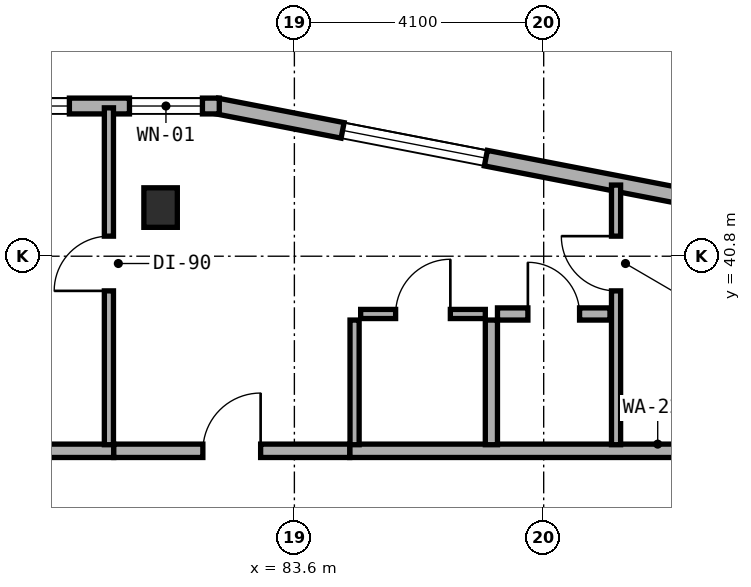
"""IFC4 building model, lengths in metres.
Left out: names, types, materials, properties, quantities, classifications, styles, units other than length and angle.
Written with IfcOpenShell. Run it as: python <this file> out.ifc"""

import sys

from ifc_helpers import new_model, si_unit, direction, frame, frame_2d, origin, origin_2d, place, context, subcontext, project, spatial, rectangle, extrude, element, fill, save


model = new_model("IFC4")
c1 = context("Model", 3, precision=1e-05, world=origin(), true_north=direction((0.0, 1.0)))
c2 = subcontext(c1, "Body", "Model", "MODEL_VIEW")
j1 = project(units=[si_unit("LENGTHUNIT", "METRE"), si_unit("PLANEANGLEUNIT", "RADIAN")], contexts=[c1])
p1 = place(None, origin())
s1 = spatial("IfcSite", under=j1, at=p1, CompositionType="ELEMENT")
p2 = place(p1, origin())
s2 = spatial("IfcBuilding", under=s1, at=p2, CompositionType="ELEMENT")
p3 = place(p2, frame((0.0, 0.0, 124.0)))
s3 = spatial("IfcBuildingStorey", under=s2, at=p3, CompositionType="ELEMENT", Elevation=124.0)
p4 = place(p3, frame((81.4, 41.6, 0.0), z_axis=(0.0, 0.0, 1.0), x_axis=(1.0, 0.0, 0.0)))
e1 = element("IfcColumn", 1, at=p4, inside=s3, PredefinedType="COLUMN", context=c2, shape_type="SweptSolid", body=[
    extrude(rectangle(XDim=0.55, YDim=0.65, at=origin_2d()), origin(), (0.0, 0.0, 1.0), 3.5),
])
p5 = place(p3, frame((90.583, 41.67, 0.0), z_axis=(0.0, 0.0, 1.0), x_axis=(-0.98174070399, 0.190224052445, 0.0)))
e2 = element("IfcWall", 2, at=p5, inside=s3, PredefinedType="STANDARD", context=c2, shape_type="SweptSolid", body=[
    extrude(rectangle(XDim=8.412, YDim=0.26, at=frame_2d((4.206, 0.0))), origin(), (0.0, 0.0, 1.0), 3.25),
])
p6 = place(p5, frame((3.905, 0.0, 0.8)))
e3 = element("IfcOpeningElement", 3, at=p6, cuts=e2, PredefinedType="OPENING", context=c2, shape_type="SweptSolid", body=[
    extrude(rectangle(XDim=2.4, YDim=1.6, at=frame_2d((1.2, 0.8))), frame((0.0, 0.14, 0.0), z_axis=(0.0, -1.0, 0.0), x_axis=(1.0, 0.0, 0.0)), (0.0, 0.0, 1.0), 0.28),
])
p7 = place(p3, frame((82.365, 43.27, 0.0), z_axis=(0.0, 0.0, 1.0), x_axis=(-1.0, 0.0, 0.0)))
e4 = element("IfcWall", 4, at=p7, inside=s3, PredefinedType="STANDARD", context=c2, shape_type="SweptSolid", body=[
    extrude(rectangle(XDim=10.695, YDim=0.26, at=frame_2d((5.348, 0.0))), origin(), (0.0, 0.0, 1.0), 3.25),
])
p8 = place(p7, frame((4.765, 0.0, 0.0)))
e5 = element("IfcOpeningElement", 5, at=p8, cuts=e4, PredefinedType="OPENING", context=c2, shape_type="SweptSolid", body=[
    extrude(rectangle(XDim=1.2, YDim=2.15, at=frame_2d((0.6, 1.075))), frame((0.0, 0.14, 0.0), z_axis=(0.0, -1.0, 0.0), x_axis=(1.0, 0.0, 0.0)), (0.0, 0.0, 1.0), 0.28),
])
p9 = place(p7, frame((0.277, 0.0, 0.85)))
e6 = element("IfcOpeningElement", 6, at=p9, cuts=e4, PredefinedType="OPENING", context=c2, shape_type="SweptSolid", body=[
    extrude(rectangle(XDim=1.2, YDim=1.5, at=frame_2d((0.6, 0.75))), frame((0.0, 0.14, 0.0), z_axis=(0.0, -1.0, 0.0), x_axis=(1.0, 0.0, 0.0)), (0.0, 0.0, 1.0), 0.28),
])
p10 = place(p7, frame((2.465, 0.0, 0.85)))
e7 = element("IfcOpeningElement", 7, at=p10, cuts=e4, PredefinedType="OPENING", context=c2, shape_type="SweptSolid", body=[
    extrude(rectangle(XDim=1.5, YDim=1.5, at=frame_2d((0.75, 0.75))), frame((0.0, 0.14, 0.0), z_axis=(0.0, -1.0, 0.0), x_axis=(1.0, 0.0, 0.0)), (0.0, 0.0, 1.0), 0.28),
])
p11 = place(p7, frame((7.96, 0.0, 0.8)))
e8 = element("IfcOpeningElement", 8, at=p11, cuts=e4, PredefinedType="OPENING", context=c2, shape_type="SweptSolid", body=[
    extrude(rectangle(XDim=2.4, YDim=1.6, at=frame_2d((1.2, 0.8))), frame((0.0, 0.14, 0.0), z_axis=(0.0, -1.0, 0.0), x_axis=(1.0, 0.0, 0.0)), (0.0, 0.0, 1.0), 0.28),
])
p12 = place(p3, frame((74.8, 37.6, 0.0), z_axis=(0.0, 0.0, 1.0), x_axis=(1.0, 0.0, 0.0)))
e9 = element("IfcWall", 9, at=p12, inside=s3, PredefinedType="SOLIDWALL", context=c2, shape_type="SweptSolid", body=[
    extrude(rectangle(XDim=5.83, YDim=0.22, at=frame_2d((2.915, 0.0))), origin(), (0.0, 0.0, 1.0), 3.22),
])
p13 = place(p3, frame((84.51, 37.6, 0.0), z_axis=(0.0, 0.0, 1.0), x_axis=(1.0, 0.0, 0.0)))
e10 = element("IfcWall", 10, at=p13, inside=s3, PredefinedType="SOLIDWALL", context=c2, shape_type="SweptSolid", body=[
    extrude(rectangle(XDim=10.13, YDim=0.22, at=frame_2d((5.065, 0.0))), origin(), (0.0, 0.0, 1.0), 2.945),
])
p14 = place(p3, frame((80.63, 37.6, 0.0), z_axis=(0.0, 0.0, 1.0), x_axis=(1.0, 0.0, 0.0)))
e11 = element("IfcWall", 11, at=p14, inside=s3, PredefinedType="SOLIDWALL", context=c2, shape_type="SweptSolid", body=[
    extrude(rectangle(XDim=3.88, YDim=0.22, at=frame_2d((1.94, 0.0))), origin(), (0.0, 0.0, 1.0), 2.825),
])
p15 = place(p14, frame((1.465, 0.0, 0.0)))
e12 = element("IfcOpeningElement", 12, at=p15, cuts=e11, PredefinedType="OPENING", context=c2, shape_type="SweptSolid", body=[
    extrude(rectangle(XDim=0.95, YDim=2.1, at=frame_2d((0.475, 1.05))), frame((0.0, 0.12, 0.0), z_axis=(0.0, -1.0, 0.0), x_axis=(1.0, 0.0, 0.0)), (0.0, 0.0, 1.0), 0.24),
])
p16 = place(p3, frame((80.55, 37.7, 0.0), z_axis=(0.0, 0.0, 1.0), x_axis=(0.0, 1.0, 0.0)))
e13 = element("IfcWall", 13, at=p16, inside=s3, PredefinedType="PARTITIONING", context=c2, shape_type="SweptSolid", body=[
    extrude(rectangle(XDim=5.54, YDim=0.15, at=frame_2d((2.77, 0.0))), origin(), (0.0, 0.0, 1.0), 2.945),
])
p17 = place(p16, frame((2.53, 0.0, 0.0)))
e14 = element("IfcOpeningElement", 14, at=p17, cuts=e13, PredefinedType="OPENING", context=c2, shape_type="SweptSolid", body=[
    extrude(rectangle(XDim=0.9, YDim=2.1, at=frame_2d((0.45, 1.05))), frame((0.0, 0.085, 0.0), z_axis=(0.0, -1.0, 0.0), x_axis=(1.0, 0.0, 0.0)), (0.0, 0.0, 1.0), 0.17),
])
p18 = place(p3, frame((88.89, 37.7, 0.0), z_axis=(0.0, 0.0, 1.0), x_axis=(0.0, 1.0, 0.0)))
e15 = element("IfcWall", 15, at=p18, inside=s3, PredefinedType="PARTITIONING", context=c2, shape_type="SweptSolid", body=[
    extrude(rectangle(XDim=4.27, YDim=0.15, at=frame_2d((2.135, 0.0))), origin(), (0.0, 0.0, 1.0), 2.945),
])
p19 = place(p18, frame((2.53, 0.0, 0.0)))
e16 = element("IfcOpeningElement", 16, at=p19, cuts=e15, PredefinedType="OPENING", context=c2, shape_type="SweptSolid", body=[
    extrude(rectangle(XDim=0.9, YDim=2.1, at=frame_2d((0.45, 1.05))), frame((0.0, 0.085, 0.0), z_axis=(0.0, -1.0, 0.0), x_axis=(1.0, 0.0, 0.0)), (0.0, 0.0, 1.0), 0.17),
])
p20 = place(p3, frame((86.84, 37.7, 0.0), z_axis=(0.0, 0.0, 1.0), x_axis=(0.0, 1.0, 0.0)))
e17 = element("IfcWall", 17, at=p20, inside=s3, PredefinedType="PLUMBINGWALL", context=c2, shape_type="SweptSolid", body=[
    extrude(rectangle(XDim=2.05, YDim=0.2, at=frame_2d((1.025, 0.0))), origin(), (0.0, 0.0, 1.0), 3.22),
])
p21 = place(p3, frame((84.59, 37.7, 0.0), z_axis=(0.0, 0.0, 1.0), x_axis=(0.0, 1.0, 0.0)))
e18 = element("IfcWall", 18, at=p21, inside=s3, PredefinedType="PARTITIONING", context=c2, shape_type="SweptSolid", body=[
    extrude(rectangle(XDim=2.05, YDim=0.15, at=frame_2d((1.025, 0.0))), origin(), (0.0, 0.0, 1.0), 3.22),
])
p22 = place(p3, frame((86.94, 39.85, 0.0), z_axis=(0.0, 0.0, 1.0), x_axis=(1.0, 0.0, 0.0)))
e19 = element("IfcWall", 19, at=p22, inside=s3, PredefinedType="PLUMBINGWALL", context=c2, shape_type="SweptSolid", body=[
    extrude(rectangle(XDim=1.85, YDim=0.2, at=frame_2d((0.925, 0.0))), origin(), (0.0, 0.0, 1.0), 3.22),
])
p23 = place(p22, frame((0.5, 0.0, 0.0)))
e20 = element("IfcOpeningElement", 20, at=p23, cuts=e19, PredefinedType="OPENING", context=c2, shape_type="SweptSolid", body=[
    extrude(rectangle(XDim=0.85, YDim=2.1, at=frame_2d((0.425, 1.05))), frame((0.0, 0.11, 0.0), z_axis=(0.0, -1.0, 0.0), x_axis=(1.0, 0.0, 0.0)), (0.0, 0.0, 1.0), 0.22),
])
p24 = place(p3, frame((84.69, 39.85, 0.0), z_axis=(0.0, 0.0, 1.0), x_axis=(1.0, 0.0, 0.0)))
e21 = element("IfcWall", 21, at=p24, inside=s3, PredefinedType="PARTITIONING", context=c2, shape_type="SweptSolid", body=[
    extrude(rectangle(XDim=2.05, YDim=0.15, at=frame_2d((1.025, 0.0))), origin(), (0.0, 0.0, 1.0), 3.22),
])
p25 = place(p24, frame((0.575, 0.0, 0.0)))
e22 = element("IfcOpeningElement", 22, at=p25, cuts=e21, PredefinedType="OPENING", context=c2, shape_type="SweptSolid", body=[
    extrude(rectangle(XDim=0.9, YDim=2.1, at=frame_2d((0.45, 1.05))), frame((0.0, 0.085, 0.0), z_axis=(0.0, -1.0, 0.0), x_axis=(1.0, 0.0, 0.0)), (0.0, 0.0, 1.0), 0.17),
])
p26 = place(p6, origin())
e23 = element("IfcWindow", 23, at=p26, inside=s3, PartitioningType="SINGLE_PANEL", PredefinedType="WINDOW", context=c2, shape_type="SweptSolid", body=[
    extrude(rectangle(XDim=2.4, YDim=1.6, at=frame_2d((1.2, 0.8))), frame((0.0, 0.03, 0.0), z_axis=(0.0, -1.0, 0.0), x_axis=(1.0, 0.0, 0.0)), (0.0, 0.0, 1.0), 0.06),
])
fill(e3, e23)
p27 = place(p9, origin())
e24 = element("IfcWindow", 24, at=p27, inside=s3, PartitioningType="SINGLE_PANEL", PredefinedType="WINDOW", context=c2, shape_type="SweptSolid", body=[
    extrude(rectangle(XDim=1.2, YDim=1.5, at=frame_2d((0.6, 0.75))), frame((0.0, 0.03, 0.0), z_axis=(0.0, -1.0, 0.0), x_axis=(1.0, 0.0, 0.0)), (0.0, 0.0, 1.0), 0.06),
])
fill(e6, e24)
p28 = place(p10, origin())
e25 = element("IfcWindow", 25, at=p28, inside=s3, PartitioningType="SINGLE_PANEL", PredefinedType="WINDOW", context=c2, shape_type="SweptSolid", body=[
    extrude(rectangle(XDim=1.5, YDim=1.5, at=frame_2d((0.75, 0.75))), frame((0.0, 0.03, 0.0), z_axis=(0.0, -1.0, 0.0), x_axis=(1.0, 0.0, 0.0)), (0.0, 0.0, 1.0), 0.06),
])
fill(e7, e25)
p29 = place(p15, origin())
e26 = element("IfcDoor", 26, at=p29, inside=s3, OperationType="SINGLE_SWING_RIGHT", PredefinedType="DOOR", context=c2, shape_type="SweptSolid", body=[
    extrude(rectangle(XDim=0.95, YDim=2.1, at=frame_2d((0.475, 1.05))), frame((0.0, 0.025, 0.0), z_axis=(0.0, -1.0, 0.0), x_axis=(1.0, 0.0, 0.0)), (0.0, 0.0, 1.0), 0.05),
])
fill(e12, e26)
p30 = place(p17, origin())
e27 = element("IfcDoor", 27, at=p30, inside=s3, OperationType="SINGLE_SWING_LEFT", PredefinedType="DOOR", context=c2, shape_type="SweptSolid", body=[
    extrude(rectangle(XDim=0.9, YDim=2.1, at=frame_2d((0.45, 1.05))), frame((0.0, 0.025, 0.0), z_axis=(0.0, -1.0, 0.0), x_axis=(1.0, 0.0, 0.0)), (0.0, 0.0, 1.0), 0.05),
])
fill(e14, e27)
p31 = place(p19, origin())
e28 = element("IfcDoor", 28, at=p31, inside=s3, OperationType="SINGLE_SWING_RIGHT", PredefinedType="DOOR", context=c2, shape_type="SweptSolid", body=[
    extrude(rectangle(XDim=0.9, YDim=2.1, at=frame_2d((0.45, 1.05))), frame((0.0, 0.025, 0.0), z_axis=(0.0, -1.0, 0.0), x_axis=(1.0, 0.0, 0.0)), (0.0, 0.0, 1.0), 0.05),
])
fill(e16, e28)
p32 = place(p23, origin())
e29 = element("IfcDoor", 29, at=p32, inside=s3, OperationType="SINGLE_SWING_LEFT", PredefinedType="DOOR", context=c2, shape_type="SweptSolid", body=[
    extrude(rectangle(XDim=0.85, YDim=2.1, at=frame_2d((0.425, 1.05))), frame((0.0, 0.025, 0.0), z_axis=(0.0, -1.0, 0.0), x_axis=(1.0, 0.0, 0.0)), (0.0, 0.0, 1.0), 0.05),
])
fill(e20, e29)
p33 = place(p25, origin())
e30 = element("IfcDoor", 30, at=p33, inside=s3, OperationType="SINGLE_SWING_RIGHT", PredefinedType="DOOR", context=c2, shape_type="SweptSolid", body=[
    extrude(rectangle(XDim=0.9, YDim=2.1, at=frame_2d((0.45, 1.05))), frame((0.0, 0.025, 0.0), z_axis=(0.0, -1.0, 0.0), x_axis=(1.0, 0.0, 0.0)), (0.0, 0.0, 1.0), 0.05),
])
fill(e22, e30)
save(model, sys.argv[1])
